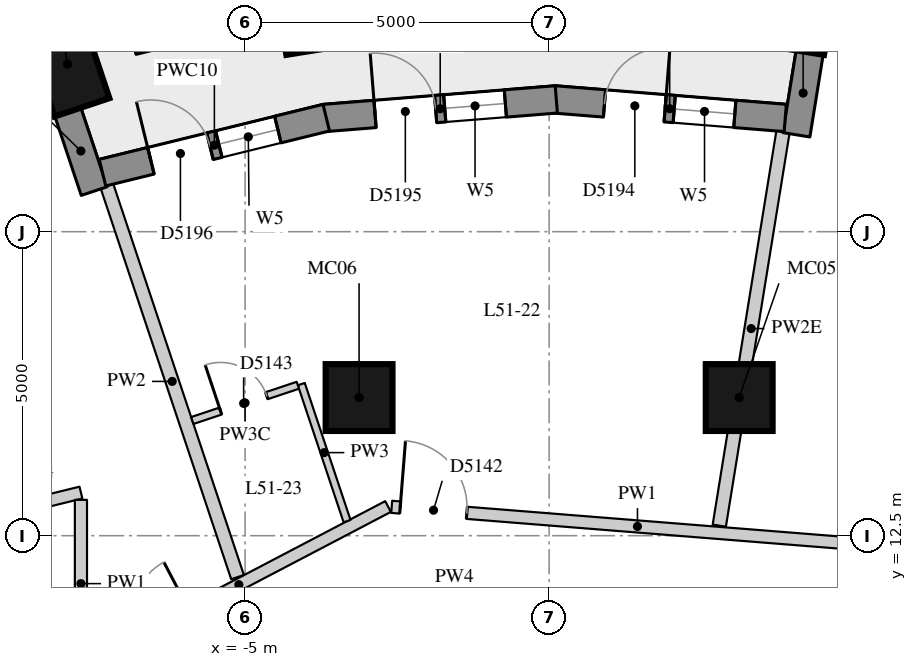
"""IFC4 building model, lengths in metres.
Left out: names, types, materials, properties, quantities, classifications, styles, units other than length and angle.
Written with IfcOpenShell. Run it as: python <this file> out.ifc"""

import sys

from ifc_helpers import new_model, si_unit, direction, frame, frame_2d, origin, origin_2d, place, context, subcontext, project, spatial, rectangle, extrude, element, fill, save


model = new_model("IFC4")
c1 = context("Model", 3, precision=1e-05, world=origin(), true_north=direction((0.0, 1.0)))
c2 = subcontext(c1, "Body", "Model", "MODEL_VIEW")
j1 = project(units=[si_unit("LENGTHUNIT", "METRE"), si_unit("PLANEANGLEUNIT", "RADIAN")], contexts=[c1])
p1 = place(None, origin())
s1 = spatial("IfcSite", under=j1, at=p1, CompositionType="ELEMENT")
p2 = place(p1, origin())
s2 = spatial("IfcBuilding", under=s1, at=p2, CompositionType="ELEMENT")
p3 = place(p2, frame((0.0, 0.0, 181.4)))
s3 = spatial("IfcBuildingStorey", under=s2, at=p3, CompositionType="ELEMENT", Elevation=181.4)
for number, where, z_axis, x_axis in (
    (1, (4.172, 21.224, 0.0), (0.0, 0.0, 1.0), (0.16, 0.987, 0.0)),
    (2, (-3.972, 21.224, 0.0), (0.0, 0.0, 1.0), (-0.16, 0.987, 0.0)),
    (3, (-7.92, 20.256, 0.0), (0.0, 0.0, 1.0), (-0.317, 0.949, 0.0)),
):
    element("IfcColumn", number, at=place(p3, frame(where, z_axis=z_axis, x_axis=x_axis)), inside=s3, PredefinedType="COLUMN", context=c2, shape_type="SweptSolid", body=[
        extrude(rectangle(XDim=1.5, YDim=0.95, at=origin_2d()), origin(), (0.0, 0.0, 1.0), 3.3),
    ])
for number, where, z_axis, x_axis in (
    (4, (3.126, 14.772, 0.0), (0.0, 0.0, 1.0), (1.0, 0.0, 0.0)),
    (5, (-3.126, 14.772, 0.0), (0.0, 0.0, 1.0), (1.0, 0.0, 0.0)),
):
    element("IfcColumn", number, at=place(p3, frame(where, z_axis=z_axis, x_axis=x_axis)), inside=s3, PredefinedType="COLUMN", context=c2, shape_type="SweptSolid", body=[
        extrude(rectangle(XDim=1.1, YDim=1.1, at=origin_2d()), origin(), (0.0, 0.0, 1.0), 3.3),
    ])
p4 = place(p3, frame((4.288, 20.466, 0.0), z_axis=(0.0, 0.0, 1.0), x_axis=(-0.159668705775, -0.987170656166, 0.0)))
e6 = element("IfcWall", 6, at=p4, inside=s3, PredefinedType="SOLIDWALL", context=c2, shape_type="SweptSolid", body=[
    extrude(rectangle(XDim=1.39, YDim=0.45, at=frame_2d((0.695, 0.0))), origin(), (0.0, 0.0, 1.0), 2.4),
])
p5 = place(p3, frame((-7.922, 19.486, 0.0), z_axis=(0.0, 0.0, 1.0), x_axis=(0.316649231286, -0.948542705589, 0.0)))
e7 = element("IfcWall", 7, at=p5, inside=s3, PredefinedType="SOLIDWALL", context=c2, shape_type="SweptSolid", body=[
    extrude(rectangle(XDim=1.39, YDim=0.45, at=frame_2d((0.695, 0.0))), origin(), (0.0, 0.0, 1.0), 2.85),
])
p6 = place(p3, frame((3.883, 19.371, 0.0), z_axis=(0.0, 0.0, 1.0), x_axis=(-0.996792437449, 0.080030223316, 0.0)))
e8 = element("IfcWall", 8, at=p6, inside=s3, PredefinedType="SOLIDWALL", context=c2, shape_type="SweptSolid", body=[
    extrude(rectangle(XDim=3.813, YDim=0.45, at=frame_2d((1.907, 0.0))), origin(), (0.0, 0.0, 1.0), 2.85),
])
p7 = place(p6, frame((0.832, 0.0, 0.4)))
e9 = element("IfcOpeningElement", 9, at=p7, cuts=e8, PredefinedType="OPENING", context=c2, shape_type="SweptSolid", body=[
    extrude(rectangle(XDim=1.0, YDim=1.75, at=frame_2d((0.5, 0.875))), frame((0.0, 0.235, 0.0), z_axis=(0.0, -1.0, 0.0), x_axis=(1.0, 0.0, 0.0)), (0.0, 0.0, 1.0), 0.47),
])
p8 = place(p6, frame((1.982, 0.0, 0.0)))
e10 = element("IfcOpeningElement", 10, at=p8, cuts=e8, PredefinedType="OPENING", context=c2, shape_type="SweptSolid", body=[
    extrude(rectangle(XDim=1.0, YDim=2.15, at=frame_2d((0.5, 1.075))), frame((0.0, 0.235, 0.0), z_axis=(0.0, -1.0, 0.0), x_axis=(1.0, 0.0, 0.0)), (0.0, 0.0, 1.0), 0.47),
])
p9 = place(p3, frame((0.118, 19.676, 0.0), z_axis=(0.0, 0.0, 1.0), x_axis=(-0.996792139022, -0.080033940204, 0.0)))
e11 = element("IfcWall", 11, at=p9, inside=s3, PredefinedType="SOLIDWALL", context=c2, shape_type="SweptSolid", body=[
    extrude(rectangle(XDim=3.831, YDim=0.45, at=frame_2d((1.916, 0.0))), origin(), (0.0, 0.0, 1.0), 2.85),
])
p10 = place(p9, frame((0.841, 0.0, 0.4)))
e12 = element("IfcOpeningElement", 12, at=p10, cuts=e11, PredefinedType="OPENING", context=c2, shape_type="SweptSolid", body=[
    extrude(rectangle(XDim=1.0, YDim=1.75, at=frame_2d((0.5, 0.875))), frame((0.0, 0.235, 0.0), z_axis=(0.0, -1.0, 0.0), x_axis=(1.0, 0.0, 0.0)), (0.0, 0.0, 1.0), 0.47),
])
p11 = place(p9, frame((1.991, 0.0, 0.0)))
e13 = element("IfcOpeningElement", 13, at=p11, cuts=e11, PredefinedType="OPENING", context=c2, shape_type="SweptSolid", body=[
    extrude(rectangle(XDim=1.0, YDim=2.15, at=frame_2d((0.5, 1.075))), frame((0.0, 0.235, 0.0), z_axis=(0.0, -1.0, 0.0), x_axis=(1.0, 0.0, 0.0)), (0.0, 0.0, 1.0), 0.47),
])
p12 = place(p3, frame((-3.665, 19.375, 0.0), z_axis=(0.0, 0.0, 1.0), x_axis=(-0.97110866251, -0.238637728782, 0.0)))
e14 = element("IfcWall", 14, at=p12, inside=s3, PredefinedType="SOLIDWALL", context=c2, shape_type="SweptSolid", body=[
    extrude(rectangle(XDim=3.789, YDim=0.45, at=frame_2d((1.895, 0.0))), origin(), (0.0, 0.0, 1.0), 2.85),
])
p13 = place(p12, frame((0.82, 0.0, 0.4)))
e15 = element("IfcOpeningElement", 15, at=p13, cuts=e14, PredefinedType="OPENING", context=c2, shape_type="SweptSolid", body=[
    extrude(rectangle(XDim=1.0, YDim=1.75, at=frame_2d((0.5, 0.875))), frame((0.0, 0.235, 0.0), z_axis=(0.0, -1.0, 0.0), x_axis=(1.0, 0.0, 0.0)), (0.0, 0.0, 1.0), 0.47),
])
p14 = place(p12, frame((1.97, 0.0, 0.0)))
e16 = element("IfcOpeningElement", 16, at=p14, cuts=e14, PredefinedType="OPENING", context=c2, shape_type="SweptSolid", body=[
    extrude(rectangle(XDim=1.0, YDim=2.15, at=frame_2d((0.5, 1.075))), frame((0.0, 0.235, 0.0), z_axis=(0.0, -1.0, 0.0), x_axis=(1.0, 0.0, 0.0)), (0.0, 0.0, 1.0), 0.47),
])
p15 = place(p3, frame((-5.129, 21.185, 0.0), z_axis=(0.0, 0.0, 1.0), x_axis=(-0.971257007956, -0.238033242419, 0.0)))
e17 = element("IfcWall", 17, at=p15, inside=s3, PredefinedType="USERDEFINED", context=c2, shape_type="SweptSolid", body=[
    extrude(rectangle(XDim=1.8, YDim=0.7, at=frame_2d((0.9, 0.0))), origin(), (0.0, 0.0, 1.0), 0.75),
])
p16 = place(p3, frame((-9.474, 12.773, 0.0), z_axis=(0.0, 0.0, 1.0), x_axis=(0.971086426401, 0.238728197874, 0.0)))
e18 = element("IfcWall", 18, at=p16, inside=s3, PredefinedType="PARTITIONING", context=c2, shape_type="SweptSolid", body=[
    extrude(rectangle(XDim=1.826, YDim=0.2, at=frame_2d((0.913, 0.0))), origin(), (0.0, 0.0, 1.0), 2.4),
])
p17 = place(p3, frame((-7.7, 13.089, 0.0), z_axis=(0.0, 0.0, 1.0), x_axis=(0.0, -1.0, 0.0)))
e19 = element("IfcWall", 19, at=p17, inside=s3, PredefinedType="PARTITIONING", context=c2, shape_type="SweptSolid", body=[
    extrude(rectangle(XDim=2.754, YDim=0.2, at=frame_2d((1.377, 0.0))), origin(), (0.0, 0.0, 1.0), 2.85),
])
p18 = place(p3, frame((-7.557, 10.409, 0.0), z_axis=(0.0, 0.0, 1.0), x_axis=(0.885861719566, 0.463949365565, 0.0)))
e20 = element("IfcWall", 20, at=p18, inside=s3, PredefinedType="PARTITIONING", context=c2, shape_type="SweptSolid", body=[
    extrude(rectangle(XDim=5.541, YDim=0.2, at=frame_2d((2.77, 0.0))), origin(), (0.0, 0.0, 1.0), 2.85),
])
p19 = place(p18, frame((0.95, 0.0, 0.0)))
e21 = element("IfcOpeningElement", 21, at=p19, cuts=e20, PredefinedType="OPENING", context=c2, shape_type="SweptSolid", body=[
    extrude(rectangle(XDim=0.9, YDim=2.1, at=frame_2d((0.45, 1.05))), frame((0.0, 0.11, 0.0), z_axis=(0.0, -1.0, 0.0), x_axis=(1.0, 0.0, 0.0)), (0.0, 0.0, 1.0), 0.22),
])
p20 = place(p3, frame((-2.589, 12.974, 0.0), z_axis=(0.0, 0.0, 1.0), x_axis=(0.996834299001, -0.079507108712, 0.0)))
e22 = element("IfcWall", 22, at=p20, inside=s3, PredefinedType="PARTITIONING", context=c2, shape_type="SweptSolid", body=[
    extrude(rectangle(XDim=8.11, YDim=0.2, at=frame_2d((4.055, 0.0))), origin(), (0.0, 0.0, 1.0), 2.85),
])
p21 = place(p20, frame((0.14, 0.0, 0.0)))
e23 = element("IfcOpeningElement", 23, at=p21, cuts=e22, PredefinedType="OPENING", context=c2, shape_type="SweptSolid", body=[
    extrude(rectangle(XDim=1.1, YDim=2.1, at=frame_2d((0.55, 1.05))), frame((0.0, 0.11, 0.0), z_axis=(0.0, -1.0, 0.0), x_axis=(1.0, 0.0, 0.0)), (0.0, 0.0, 1.0), 0.22),
])
p22 = place(p3, frame((3.847, 19.148, 0.0), z_axis=(0.0, 0.0, 1.0), x_axis=(-0.159670729912, -0.987170328773, 0.0)))
e24 = element("IfcWall", 24, at=p22, inside=s3, PredefinedType="PARTITIONING", context=c2, shape_type="SweptSolid", body=[
    extrude(rectangle(XDim=6.567, YDim=0.22, at=frame_2d((3.284, 0.0))), origin(), (0.0, 0.0, 1.0), 2.4),
])
p23 = place(p3, frame((-7.274, 18.256, 0.0), z_axis=(0.0, 0.0, 1.0), x_axis=(0.316724121691, -0.948517701859, 0.0)))
e25 = element("IfcWall", 25, at=p23, inside=s3, PredefinedType="PARTITIONING", context=c2, shape_type="SweptSolid", body=[
    extrude(rectangle(XDim=6.787, YDim=0.22, at=frame_2d((3.394, 0.0))), origin(), (0.0, 0.0, 1.0), 2.85),
])
p24 = place(p3, frame((-3.323, 12.74, 0.0), z_axis=(0.0, 0.0, 1.0), x_axis=(-0.316720994124, 0.948518746194, 0.0)))
e26 = element("IfcWall", 26, at=p24, inside=s3, PredefinedType="PARTITIONING", context=c2, shape_type="SweptSolid", body=[
    extrude(rectangle(XDim=2.376, YDim=0.12, at=frame_2d((1.188, 0.0))), origin(), (0.0, 0.0, 1.0), 2.85),
])
p25 = place(p3, frame((-4.133, 14.974, 0.0), z_axis=(0.0, 0.0, 1.0), x_axis=(-0.9485230882, -0.31670799035, 0.0)))
e27 = element("IfcWall", 27, at=p25, inside=s3, PredefinedType="PARTITIONING", context=c2, shape_type="SweptSolid", body=[
    extrude(rectangle(XDim=1.83, YDim=0.12, at=frame_2d((0.915, 0.0))), origin(), (0.0, 0.0, 1.0), 2.4),
])
p26 = place(p25, frame((0.54, 0.0, 0.0)))
e28 = element("IfcOpeningElement", 28, at=p26, cuts=e27, PredefinedType="OPENING", context=c2, shape_type="SweptSolid", body=[
    extrude(rectangle(XDim=0.8, YDim=2.1, at=frame_2d((0.4, 1.05))), frame((0.0, 0.07, 0.0), z_axis=(0.0, -1.0, 0.0), x_axis=(1.0, 0.0, 0.0)), (0.0, 0.0, 1.0), 0.14),
])
p27 = place(p7, origin())
e29 = element("IfcWindow", 29, at=p27, inside=s3, PartitioningType="SINGLE_PANEL", PredefinedType="WINDOW", context=c2, shape_type="SweptSolid", body=[
    extrude(rectangle(XDim=1.0, YDim=1.75, at=frame_2d((0.5, 0.875))), frame((0.0, 0.035, 0.0), z_axis=(0.0, -1.0, 0.0), x_axis=(1.0, 0.0, 0.0)), (0.0, 0.0, 1.0), 0.06),
])
fill(e9, e29)
p28 = place(p8, frame((1.0, 0.0, 0.0), z_axis=(0.0, 0.0, 1.0), x_axis=(-1.0, 0.0, 0.0)))
e30 = element("IfcDoor", 30, at=p28, inside=s3, OperationType="SINGLE_SWING_RIGHT", PredefinedType="DOOR", context=c2, shape_type="SweptSolid", body=[
    extrude(rectangle(XDim=1.0, YDim=2.15, at=frame_2d((0.5, 1.075))), frame((0.0, 0.075, 0.0), z_axis=(0.0, -1.0, 0.0), x_axis=(1.0, 0.0, 0.0)), (0.0, 0.0, 1.0), 0.05),
])
fill(e10, e30)
p29 = place(p10, origin())
e31 = element("IfcWindow", 31, at=p29, inside=s3, PartitioningType="SINGLE_PANEL", PredefinedType="WINDOW", context=c2, shape_type="SweptSolid", body=[
    extrude(rectangle(XDim=1.0, YDim=1.75, at=frame_2d((0.5, 0.875))), frame((0.0, 0.035, 0.0), z_axis=(0.0, -1.0, 0.0), x_axis=(1.0, 0.0, 0.0)), (0.0, 0.0, 1.0), 0.06),
])
fill(e12, e31)
p30 = place(p11, frame((1.0, 0.0, 0.0), z_axis=(0.0, 0.0, 1.0), x_axis=(-1.0, 0.0, 0.0)))
e32 = element("IfcDoor", 32, at=p30, inside=s3, OperationType="SINGLE_SWING_LEFT", PredefinedType="DOOR", context=c2, shape_type="SweptSolid", body=[
    extrude(rectangle(XDim=1.0, YDim=2.15, at=frame_2d((0.5, 1.075))), frame((0.0, 0.075, 0.0), z_axis=(0.0, -1.0, 0.0), x_axis=(1.0, 0.0, 0.0)), (0.0, 0.0, 1.0), 0.05),
])
fill(e13, e32)
p31 = place(p13, origin())
e33 = element("IfcWindow", 33, at=p31, inside=s3, PartitioningType="SINGLE_PANEL", PredefinedType="WINDOW", context=c2, shape_type="SweptSolid", body=[
    extrude(rectangle(XDim=1.0, YDim=1.75, at=frame_2d((0.5, 0.875))), frame((0.0, 0.035, 0.0), z_axis=(0.0, -1.0, 0.0), x_axis=(1.0, 0.0, 0.0)), (0.0, 0.0, 1.0), 0.06),
])
fill(e15, e33)
p32 = place(p14, frame((1.0, 0.0, 0.0), z_axis=(0.0, 0.0, 1.0), x_axis=(-1.0, 0.0, 0.0)))
e34 = element("IfcDoor", 34, at=p32, inside=s3, OperationType="SINGLE_SWING_LEFT", PredefinedType="DOOR", context=c2, shape_type="SweptSolid", body=[
    extrude(rectangle(XDim=1.0, YDim=2.15, at=frame_2d((0.5, 1.075))), frame((0.0, 0.075, 0.0), z_axis=(0.0, -1.0, 0.0), x_axis=(1.0, 0.0, 0.0)), (0.0, 0.0, 1.0), 0.05),
])
fill(e16, e34)
p33 = place(p21, origin())
e35 = element("IfcDoor", 35, at=p33, inside=s3, OperationType="SINGLE_SWING_LEFT", PredefinedType="DOOR", context=c2, shape_type="SweptSolid", body=[
    extrude(rectangle(XDim=1.1, YDim=2.1, at=frame_2d((0.55, 1.05))), frame((0.0, 0.025, 0.0), z_axis=(0.0, -1.0, 0.0), x_axis=(1.0, 0.0, 0.0)), (0.0, 0.0, 1.0), 0.05),
])
fill(e23, e35)
p34 = place(p26, origin())
e36 = element("IfcDoor", 36, at=p34, inside=s3, OperationType="SINGLE_SWING_LEFT", PredefinedType="DOOR", context=c2, shape_type="SweptSolid", body=[
    extrude(rectangle(XDim=0.8, YDim=2.1, at=frame_2d((0.4, 1.05))), frame((0.0, 0.025, 0.0), z_axis=(0.0, -1.0, 0.0), x_axis=(1.0, 0.0, 0.0)), (0.0, 0.0, 1.0), 0.05),
])
fill(e28, e36)
save(model, sys.argv[1])
